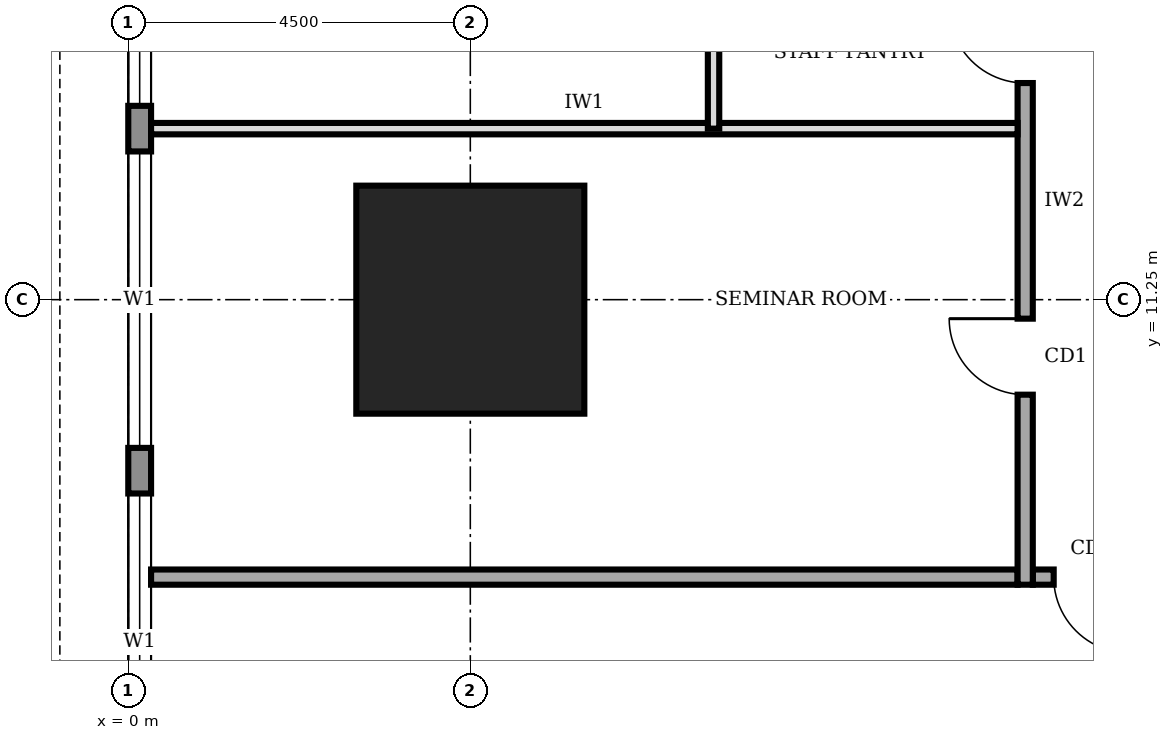
"""IFC4 building model, lengths in metres.
Left out: names, types, materials, properties, quantities, classifications, styles, units other than length and angle.
Written with IfcOpenShell. Run it as: python <this file> out.ifc"""

import sys

from ifc_helpers import new_model, si_unit, direction, frame, frame_2d, origin, origin_2d, place, context, subcontext, project, spatial, rectangle, extrude, element, fill, save


model = new_model("IFC4")
c1 = context("Model", 3, precision=1e-05, world=origin(), true_north=direction((0.0, 1.0)))
c2 = subcontext(c1, "Body", "Model", "MODEL_VIEW")
j1 = project(units=[si_unit("LENGTHUNIT", "METRE"), si_unit("PLANEANGLEUNIT", "RADIAN")], contexts=[c1])
p1 = place(None, origin())
s1 = spatial("IfcSite", under=j1, at=p1, CompositionType="ELEMENT")
p2 = place(p1, origin())
s2 = spatial("IfcBuilding", under=s1, at=p2, CompositionType="ELEMENT")
p3 = place(p2, frame((0.0, 0.0, 29.0)))
s3 = spatial("IfcBuildingStorey", under=s2, at=p3, CompositionType="ELEMENT", Elevation=29.0)
p4 = place(p3, frame((4.5, 11.25, 0.0), z_axis=(0.0, 0.0, 1.0), x_axis=(1.0, 0.0, 0.0)))
e1 = element("IfcColumn", 1, at=p4, inside=s3, PredefinedType="COLUMN", context=c2, shape_type="SweptSolid", body=[
    extrude(rectangle(XDim=3.0, YDim=3.0, at=origin_2d()), origin(), (0.0, 0.0, 1.0), 4.0),
])
p5 = place(p3, frame((0.15, 35.98, 0.0), z_axis=(0.0, 0.0, 1.0), x_axis=(0.0, -1.0, 0.0)))
e2 = element("IfcWall", 2, at=p5, inside=s3, PredefinedType="STANDARD", context=c2, shape_type="SweptSolid", body=[
    extrude(rectangle(XDim=31.46, YDim=0.3, at=frame_2d((15.73, 0.0))), origin(), (0.0, 0.0, 1.0), 3.75),
])
p6 = place(p5, frame((27.28, 0.0, 0.9)))
e3 = element("IfcOpeningElement", 3, at=p6, cuts=e2, PredefinedType="OPENING", context=c2, shape_type="SweptSolid", body=[
    extrude(rectangle(XDim=3.9, YDim=2.2, at=frame_2d((1.95, 1.1))), frame((0.0, 0.16, 0.0), z_axis=(0.0, -1.0, 0.0), x_axis=(1.0, 0.0, 0.0)), (0.0, 0.0, 1.0), 0.32),
])
p7 = place(p5, frame((22.78, 0.0, 0.9)))
e4 = element("IfcOpeningElement", 4, at=p7, cuts=e2, PredefinedType="OPENING", context=c2, shape_type="SweptSolid", body=[
    extrude(rectangle(XDim=3.9, YDim=2.2, at=frame_2d((1.95, 1.1))), frame((0.0, 0.16, 0.0), z_axis=(0.0, -1.0, 0.0), x_axis=(1.0, 0.0, 0.0)), (0.0, 0.0, 1.0), 0.32),
])
p8 = place(p5, frame((18.28, 0.0, 0.9)))
e5 = element("IfcOpeningElement", 5, at=p8, cuts=e2, PredefinedType="OPENING", context=c2, shape_type="SweptSolid", body=[
    extrude(rectangle(XDim=3.9, YDim=2.2, at=frame_2d((1.95, 1.1))), frame((0.0, 0.16, 0.0), z_axis=(0.0, -1.0, 0.0), x_axis=(1.0, 0.0, 0.0)), (0.0, 0.0, 1.0), 0.32),
])
p9 = place(p5, frame((13.78, 0.0, 0.9)))
e6 = element("IfcOpeningElement", 6, at=p9, cuts=e2, PredefinedType="OPENING", context=c2, shape_type="SweptSolid", body=[
    extrude(rectangle(XDim=3.9, YDim=2.2, at=frame_2d((1.95, 1.1))), frame((0.0, 0.16, 0.0), z_axis=(0.0, -1.0, 0.0), x_axis=(1.0, 0.0, 0.0)), (0.0, 0.0, 1.0), 0.32),
])
p10 = place(p5, frame((9.28, 0.0, 0.9)))
e7 = element("IfcOpeningElement", 7, at=p10, cuts=e2, PredefinedType="OPENING", context=c2, shape_type="SweptSolid", body=[
    extrude(rectangle(XDim=3.9, YDim=2.2, at=frame_2d((1.95, 1.1))), frame((0.0, 0.16, 0.0), z_axis=(0.0, -1.0, 0.0), x_axis=(1.0, 0.0, 0.0)), (0.0, 0.0, 1.0), 0.32),
])
p11 = place(p5, frame((4.78, 0.0, 0.9)))
e8 = element("IfcOpeningElement", 8, at=p11, cuts=e2, PredefinedType="OPENING", context=c2, shape_type="SweptSolid", body=[
    extrude(rectangle(XDim=3.9, YDim=2.2, at=frame_2d((1.95, 1.1))), frame((0.0, 0.16, 0.0), z_axis=(0.0, -1.0, 0.0), x_axis=(1.0, 0.0, 0.0)), (0.0, 0.0, 1.0), 0.32),
])
p12 = place(p3, frame((11.9, 7.6, 0.0), z_axis=(0.0, 0.0, 1.0), x_axis=(1.0, 0.0, 0.0)))
e9 = element("IfcWall", 9, at=p12, inside=s3, PredefinedType="SOLIDWALL", context=c2, shape_type="SweptSolid", body=[
    extrude(rectangle(XDim=16.9, YDim=0.2, at=frame_2d((8.45, 0.0))), origin(), (0.0, 0.0, 1.0), 3.75),
])
p13 = place(p12, frame((0.275, 0.0, 0.0)))
e10 = element("IfcOpeningElement", 10, at=p13, cuts=e9, PredefinedType="OPENING", context=c2, shape_type="SweptSolid", body=[
    extrude(rectangle(XDim=1.0, YDim=2.1, at=frame_2d((0.5, 1.05))), frame((0.0, 0.11, 0.0), z_axis=(0.0, -1.0, 0.0), x_axis=(1.0, 0.0, 0.0)), (0.0, 0.0, 1.0), 0.22),
])
p14 = place(p12, frame((5.6, 0.0, 0.0)))
e11 = element("IfcOpeningElement", 11, at=p14, cuts=e9, PredefinedType="OPENING", context=c2, shape_type="SweptSolid", body=[
    extrude(rectangle(XDim=1.0, YDim=2.1, at=frame_2d((0.5, 1.05))), frame((0.0, 0.11, 0.0), z_axis=(0.0, -1.0, 0.0), x_axis=(1.0, 0.0, 0.0)), (0.0, 0.0, 1.0), 0.22),
])
p15 = place(p12, frame((12.35, 0.0, 0.0)))
e12 = element("IfcOpeningElement", 12, at=p15, cuts=e9, PredefinedType="OPENING", context=c2, shape_type="SweptSolid", body=[
    extrude(rectangle(XDim=1.0, YDim=2.1, at=frame_2d((0.5, 1.05))), frame((0.0, 0.11, 0.0), z_axis=(0.0, -1.0, 0.0), x_axis=(1.0, 0.0, 0.0)), (0.0, 0.0, 1.0), 0.22),
])
p16 = place(p12, frame((15.425, 0.0, 0.0)))
e13 = element("IfcOpeningElement", 13, at=p16, cuts=e9, PredefinedType="OPENING", context=c2, shape_type="SweptSolid", body=[
    extrude(rectangle(XDim=1.0, YDim=2.1, at=frame_2d((0.5, 1.05))), frame((0.0, 0.11, 0.0), z_axis=(0.0, -1.0, 0.0), x_axis=(1.0, 0.0, 0.0)), (0.0, 0.0, 1.0), 0.22),
])
p17 = place(p3, frame((11.8, 31.3, 0.0), z_axis=(0.0, 0.0, 1.0), x_axis=(0.0, -1.0, 0.0)))
e14 = element("IfcWall", 14, at=p17, inside=s3, PredefinedType="SOLIDWALL", context=c2, shape_type="SweptSolid", body=[
    extrude(rectangle(XDim=23.8, YDim=0.2, at=frame_2d((11.9, 0.0))), origin(), (0.0, 0.0, 1.0), 3.75),
])
p18 = place(p17, frame((20.3, 0.0, 0.0)))
e15 = element("IfcOpeningElement", 15, at=p18, cuts=e14, PredefinedType="OPENING", context=c2, shape_type="SweptSolid", body=[
    extrude(rectangle(XDim=1.0, YDim=2.1, at=frame_2d((0.5, 1.05))), frame((0.0, 0.11, 0.0), z_axis=(0.0, -1.0, 0.0), x_axis=(1.0, 0.0, 0.0)), (0.0, 0.0, 1.0), 0.22),
])
p19 = place(p17, frame((16.2, 0.0, 0.0)))
e16 = element("IfcOpeningElement", 16, at=p19, cuts=e14, PredefinedType="OPENING", context=c2, shape_type="SweptSolid", body=[
    extrude(rectangle(XDim=1.0, YDim=2.1, at=frame_2d((0.5, 1.05))), frame((0.0, 0.11, 0.0), z_axis=(0.0, -1.0, 0.0), x_axis=(1.0, 0.0, 0.0)), (0.0, 0.0, 1.0), 0.22),
])
p20 = place(p17, frame((13.2, 0.0, 0.0)))
e17 = element("IfcOpeningElement", 17, at=p20, cuts=e14, PredefinedType="OPENING", context=c2, shape_type="SweptSolid", body=[
    extrude(rectangle(XDim=0.9, YDim=2.1, at=frame_2d((0.45, 1.05))), frame((0.0, 0.11, 0.0), z_axis=(0.0, -1.0, 0.0), x_axis=(1.0, 0.0, 0.0)), (0.0, 0.0, 1.0), 0.22),
])
p21 = place(p17, frame((10.15, 0.0, 0.0)))
e18 = element("IfcOpeningElement", 18, at=p21, cuts=e14, PredefinedType="OPENING", context=c2, shape_type="SweptSolid", body=[
    extrude(rectangle(XDim=0.9, YDim=2.1, at=frame_2d((0.45, 1.05))), frame((0.0, 0.11, 0.0), z_axis=(0.0, -1.0, 0.0), x_axis=(1.0, 0.0, 0.0)), (0.0, 0.0, 1.0), 0.22),
])
p22 = place(p17, frame((5.45, 0.0, 0.0)))
e19 = element("IfcOpeningElement", 19, at=p22, cuts=e14, PredefinedType="OPENING", context=c2, shape_type="SweptSolid", body=[
    extrude(rectangle(XDim=0.9, YDim=2.1, at=frame_2d((0.45, 1.05))), frame((0.0, 0.11, 0.0), z_axis=(0.0, -1.0, 0.0), x_axis=(1.0, 0.0, 0.0)), (0.0, 0.0, 1.0), 0.22),
])
p23 = place(p17, frame((8.0, 0.0, 0.0)))
e20 = element("IfcOpeningElement", 20, at=p23, cuts=e14, PredefinedType="OPENING", context=c2, shape_type="SweptSolid", body=[
    extrude(rectangle(XDim=1.0, YDim=2.1, at=frame_2d((0.5, 1.05))), frame((0.0, 0.11, 0.0), z_axis=(0.0, -1.0, 0.0), x_axis=(1.0, 0.0, 0.0)), (0.0, 0.0, 1.0), 0.22),
])
p24 = place(p17, frame((1.55, 0.0, 0.0)))
e21 = element("IfcOpeningElement", 21, at=p24, cuts=e14, PredefinedType="OPENING", context=c2, shape_type="SweptSolid", body=[
    extrude(rectangle(XDim=1.0, YDim=2.1, at=frame_2d((0.5, 1.05))), frame((0.0, 0.11, 0.0), z_axis=(0.0, -1.0, 0.0), x_axis=(1.0, 0.0, 0.0)), (0.0, 0.0, 1.0), 0.22),
])
p25 = place(p3, frame((0.3, 7.6, 0.0), z_axis=(0.0, 0.0, 1.0), x_axis=(1.0, 0.0, 0.0)))
e22 = element("IfcWall", 22, at=p25, inside=s3, PredefinedType="SOLIDWALL", context=c2, shape_type="SweptSolid", body=[
    extrude(rectangle(XDim=11.4, YDim=0.2, at=frame_2d((5.7, 0.0))), origin(), (0.0, 0.0, 1.0), 3.75),
])
p26 = place(p3, frame((0.3, 13.5, 0.0), z_axis=(0.0, 0.0, 1.0), x_axis=(1.0, 0.0, 0.0)))
e23 = element("IfcWall", 23, at=p26, inside=s3, PredefinedType="PARTITIONING", context=c2, shape_type="SweptSolid", body=[
    extrude(rectangle(XDim=11.4, YDim=0.15, at=frame_2d((5.7, 0.0))), origin(), (0.0, 0.0, 1.0), 3.75),
])
p27 = place(p3, frame((7.7, 13.5, 0.0), z_axis=(0.0, 0.0, 1.0), x_axis=(0.0, 1.0, 0.0)))
e24 = element("IfcWall", 24, at=p27, inside=s3, PredefinedType="PARTITIONING", context=c2, shape_type="SweptSolid", body=[
    extrude(rectangle(XDim=2.2, YDim=0.15, at=frame_2d((1.1, 0.0))), origin(), (0.0, 0.0, 1.0), 3.75),
])
p28 = place(p6, origin())
e25 = element("IfcWindow", 25, at=p28, inside=s3, PartitioningType="SINGLE_PANEL", PredefinedType="WINDOW", context=c2, shape_type="SweptSolid", body=[
    extrude(rectangle(XDim=3.9, YDim=2.2, at=frame_2d((1.95, 1.1))), frame((0.0, 0.03, 0.0), z_axis=(0.0, -1.0, 0.0), x_axis=(1.0, 0.0, 0.0)), (0.0, 0.0, 1.0), 0.06),
])
fill(e3, e25)
p29 = place(p7, origin())
e26 = element("IfcWindow", 26, at=p29, inside=s3, PartitioningType="SINGLE_PANEL", PredefinedType="WINDOW", context=c2, shape_type="SweptSolid", body=[
    extrude(rectangle(XDim=3.9, YDim=2.2, at=frame_2d((1.95, 1.1))), frame((0.0, 0.03, 0.0), z_axis=(0.0, -1.0, 0.0), x_axis=(1.0, 0.0, 0.0)), (0.0, 0.0, 1.0), 0.06),
])
fill(e4, e26)
p30 = place(p8, origin())
e27 = element("IfcWindow", 27, at=p30, inside=s3, PartitioningType="SINGLE_PANEL", PredefinedType="WINDOW", context=c2, shape_type="SweptSolid", body=[
    extrude(rectangle(XDim=3.9, YDim=2.2, at=frame_2d((1.95, 1.1))), frame((0.0, 0.03, 0.0), z_axis=(0.0, -1.0, 0.0), x_axis=(1.0, 0.0, 0.0)), (0.0, 0.0, 1.0), 0.06),
])
fill(e5, e27)
p31 = place(p13, frame((1.0, 0.0, 0.0), z_axis=(0.0, 0.0, 1.0), x_axis=(-1.0, 0.0, 0.0)))
e28 = element("IfcDoor", 28, at=p31, inside=s3, OperationType="SINGLE_SWING_LEFT", PredefinedType="DOOR", context=c2, shape_type="SweptSolid", body=[
    extrude(rectangle(XDim=1.0, YDim=2.1, at=frame_2d((0.5, 1.05))), frame((0.0, 0.025, 0.0), z_axis=(0.0, -1.0, 0.0), x_axis=(1.0, 0.0, 0.0)), (0.0, 0.0, 1.0), 0.05),
])
fill(e10, e28)
p32 = place(p18, frame((1.0, 0.0, 0.0), z_axis=(0.0, 0.0, 1.0), x_axis=(-1.0, 0.0, 0.0)))
e29 = element("IfcDoor", 29, at=p32, inside=s3, OperationType="SINGLE_SWING_RIGHT", PredefinedType="DOOR", context=c2, shape_type="SweptSolid", body=[
    extrude(rectangle(XDim=1.0, YDim=2.1, at=frame_2d((0.5, 1.05))), frame((0.0, 0.025, 0.0), z_axis=(0.0, -1.0, 0.0), x_axis=(1.0, 0.0, 0.0)), (0.0, 0.0, 1.0), 0.05),
])
fill(e15, e29)
p33 = place(p19, frame((1.0, 0.0, 0.0), z_axis=(0.0, 0.0, 1.0), x_axis=(-1.0, 0.0, 0.0)))
e30 = element("IfcDoor", 30, at=p33, inside=s3, OperationType="SINGLE_SWING_RIGHT", PredefinedType="DOOR", context=c2, shape_type="SweptSolid", body=[
    extrude(rectangle(XDim=1.0, YDim=2.1, at=frame_2d((0.5, 1.05))), frame((0.0, 0.025, 0.0), z_axis=(0.0, -1.0, 0.0), x_axis=(1.0, 0.0, 0.0)), (0.0, 0.0, 1.0), 0.05),
])
fill(e16, e30)
save(model, sys.argv[1])
